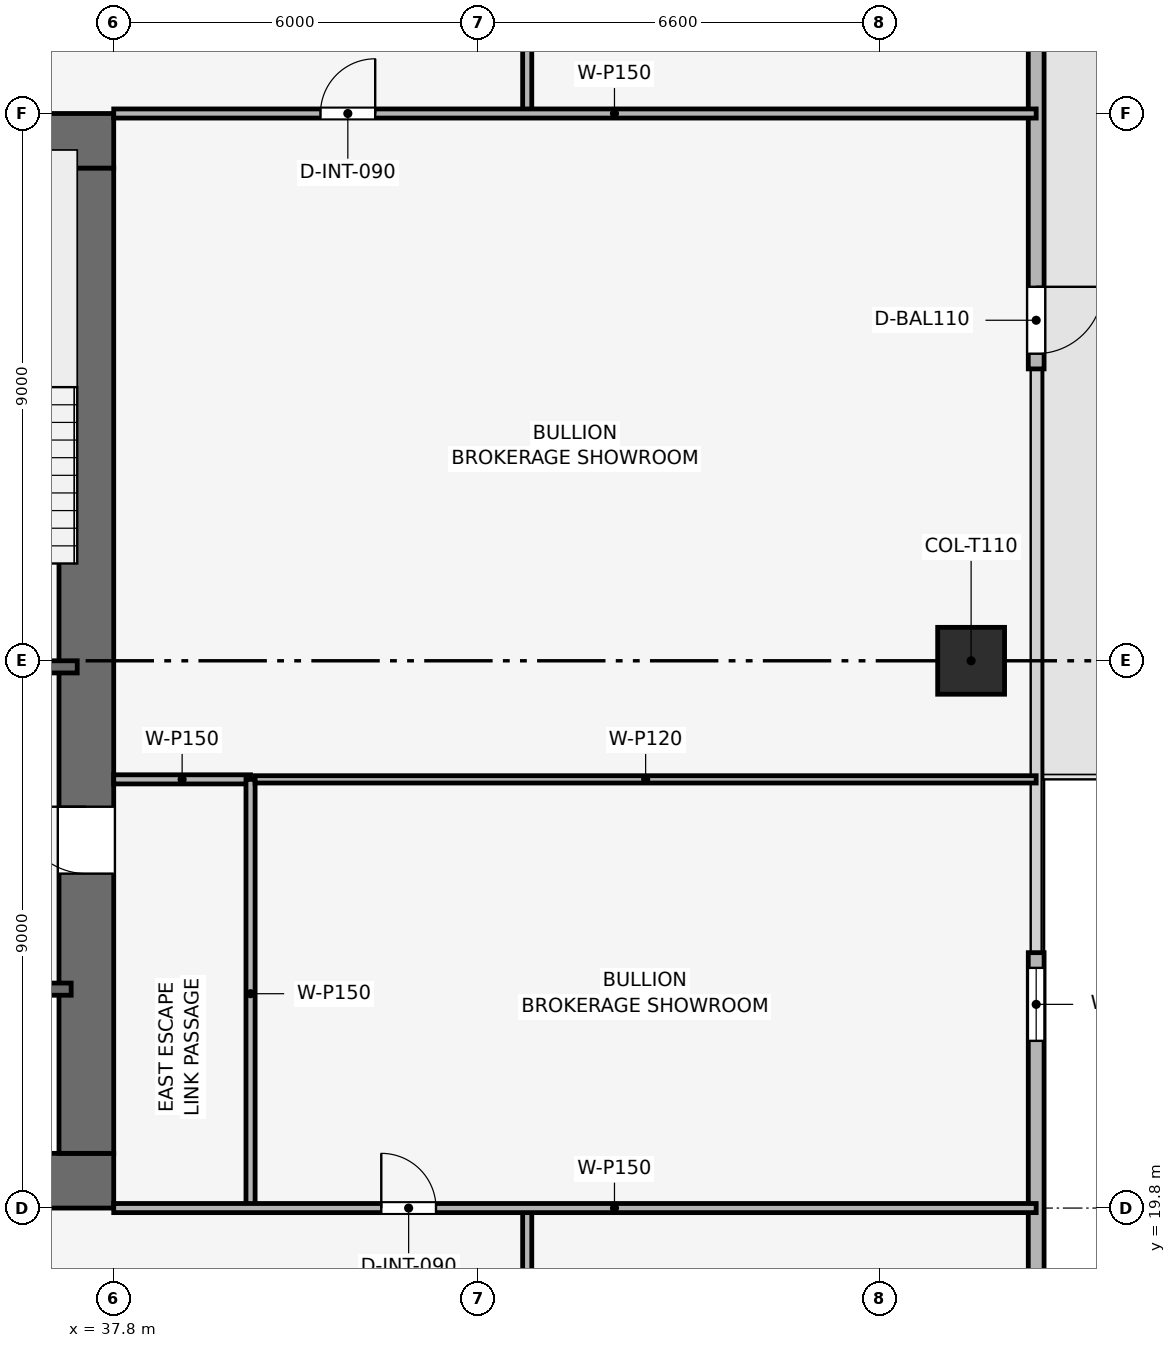
"""IFC4 building model, lengths in metres.
Left out: names, types, materials, properties, quantities, classifications, styles, units other than length and angle.
Written with IfcOpenShell. Run it as: python <this file> out.ifc"""

import sys

from ifc_helpers import new_model, si_unit, direction, frame, frame_2d, origin, origin_2d, place, context, subcontext, project, spatial, rectangle, extrude, element, fill, save


model = new_model("IFC4")
c1 = context("Model", 3, precision=1e-05, world=origin(), true_north=direction((0.0, 1.0)))
c2 = subcontext(c1, "Body", "Model", "MODEL_VIEW")
j1 = project(units=[si_unit("LENGTHUNIT", "METRE"), si_unit("PLANEANGLEUNIT", "RADIAN")], contexts=[c1])
p1 = place(None, origin())
s1 = spatial("IfcSite", under=j1, at=p1, CompositionType="ELEMENT")
p2 = place(p1, origin())
s2 = spatial("IfcBuilding", under=s1, at=p2, CompositionType="ELEMENT")
p3 = place(p2, frame((0.0, 0.0, 145.8)))
s3 = spatial("IfcBuildingStorey", under=s2, at=p3, CompositionType="ELEMENT", Elevation=145.8)
p4 = place(p3, frame((19.8, 20.25, 0.0), z_axis=(0.0, 0.0, 1.0), x_axis=(1.0, 0.0, 0.0)))
e1 = element("IfcWall", 1, at=p4, inside=s3, PredefinedType="SHEAR", context=c2, shape_type="SweptSolid", body=[
    extrude(rectangle(XDim=18.0, YDim=0.9, at=frame_2d((9.0, 0.0))), origin(), (0.0, 0.0, 1.0), 3.75),
])
p5 = place(p4, frame((8.4, 0.0, 0.0)))
e2 = element("IfcOpeningElement", 2, at=p5, cuts=e1, PredefinedType="OPENING", context=c2, shape_type="SweptSolid", body=[
    extrude(rectangle(XDim=1.2, YDim=2.2, at=frame_2d((0.6, 1.1))), frame((0.0, 0.46, 0.0), z_axis=(0.0, -1.0, 0.0), x_axis=(1.0, 0.0, 0.0)), (0.0, 0.0, 1.0), 0.92),
])
p6 = place(p3, frame((19.8, 37.35, 0.0), z_axis=(0.0, 0.0, 1.0), x_axis=(1.0, 0.0, 0.0)))
e3 = element("IfcWall", 3, at=p6, inside=s3, PredefinedType="SHEAR", context=c2, shape_type="SweptSolid", body=[
    extrude(rectangle(XDim=18.0, YDim=0.9, at=frame_2d((9.0, 0.0))), origin(), (0.0, 0.0, 1.0), 3.75),
])
p7 = place(p6, frame((7.05, 0.0, 0.0)))
e4 = element("IfcOpeningElement", 4, at=p7, cuts=e3, PredefinedType="OPENING", context=c2, shape_type="SweptSolid", body=[
    extrude(rectangle(XDim=1.1, YDim=2.15, at=frame_2d((0.55, 1.075))), frame((0.0, 0.46, 0.0), z_axis=(0.0, -1.0, 0.0), x_axis=(1.0, 0.0, 0.0)), (0.0, 0.0, 1.0), 0.92),
])
p8 = place(p3, frame((37.35, 20.7, 0.0), z_axis=(0.0, 0.0, 1.0), x_axis=(0.0, 1.0, 0.0)))
e5 = element("IfcWall", 5, at=p8, inside=s3, PredefinedType="SHEAR", context=c2, shape_type="SweptSolid", body=[
    extrude(rectangle(XDim=16.2, YDim=0.9, at=frame_2d((8.1, 0.0))), origin(), (0.0, 0.0, 1.0), 3.75),
])
p9 = place(p8, frame((4.6, 0.0, 0.0)))
e6 = element("IfcOpeningElement", 6, at=p9, cuts=e5, PredefinedType="OPENING", context=c2, shape_type="SweptSolid", body=[
    extrude(rectangle(XDim=1.1, YDim=2.15, at=frame_2d((0.55, 1.075))), frame((0.0, 0.46, 0.0), z_axis=(0.0, -1.0, 0.0), x_axis=(1.0, 0.0, 0.0)), (0.0, 0.0, 1.0), 0.92),
])
p10 = place(p3, frame((51.9, 28.8, 0.003), z_axis=(0.0, 0.0, 1.0), x_axis=(1.0, 0.0, 0.0)))
e7 = element("IfcColumn", 7, at=p10, inside=s3, PredefinedType="COLUMN", context=c2, shape_type="SweptSolid", body=[
    extrude(rectangle(XDim=1.1, YDim=1.1, at=origin_2d()), origin(), (0.0, 0.0, 1.0), 3.489),
])
p11 = place(p3, frame((52.97, 46.2, 0.0), z_axis=(0.0, 0.0, 1.0), x_axis=(0.0, -1.0, 0.0)))
e8 = element("IfcWall", 8, at=p11, inside=s3, PredefinedType="SOLIDWALL", context=c2, shape_type="SweptSolid", body=[
    extrude(rectangle(XDim=12.6, YDim=0.26, at=frame_2d((6.3, 0.0))), origin(), (0.0, 0.0, 1.0), 3.495),
])
p12 = place(p11, frame((11.25, 0.0, 0.0)))
e9 = element("IfcOpeningElement", 9, at=p12, cuts=e8, PredefinedType="OPENING", context=c2, shape_type="SweptSolid", body=[
    extrude(rectangle(XDim=1.1, YDim=2.2, at=frame_2d((0.55, 1.1))), frame((0.0, 0.14, 0.0), z_axis=(0.0, -1.0, 0.0), x_axis=(1.0, 0.0, 0.0)), (0.0, 0.0, 1.0), 0.28),
])
p13 = place(p3, frame((52.97, 24.0, 0.0), z_axis=(0.0, 0.0, 1.0), x_axis=(0.0, -1.0, 0.0)))
e10 = element("IfcWall", 10, at=p13, inside=s3, PredefinedType="SOLIDWALL", context=c2, shape_type="SweptSolid", body=[
    extrude(rectangle(XDim=12.6, YDim=0.26, at=frame_2d((6.3, 0.0))), origin(), (0.0, 0.0, 1.0), 3.495),
])
p14 = place(p13, frame((0.25, 0.0, 0.9)))
e11 = element("IfcOpeningElement", 11, at=p14, cuts=e10, PredefinedType="OPENING", context=c2, shape_type="SweptSolid", body=[
    extrude(rectangle(XDim=1.2, YDim=2.1, at=frame_2d((0.6, 1.05))), frame((0.0, 0.14, 0.0), z_axis=(0.0, -1.0, 0.0), x_axis=(1.0, 0.0, 0.0)), (0.0, 0.0, 1.0), 0.28),
])
p15 = place(p3, frame((34.05, 28.7, 0.0), z_axis=(0.0, 0.0, 1.0), x_axis=(1.0, 0.0, 0.0)))
e12 = element("IfcWall", 12, at=p15, inside=s3, PredefinedType="SHEAR", context=c2, shape_type="SweptSolid", body=[
    extrude(rectangle(XDim=3.15, YDim=0.2, at=frame_2d((1.575, 0.0))), origin(), (0.0, 0.0, 1.0), 3.495),
])
p16 = place(p15, frame((0.8, 0.0, 0.0)))
e13 = element("IfcOpeningElement", 13, at=p16, cuts=e12, PredefinedType="OPENING", context=c2, shape_type="SweptSolid", body=[
    extrude(rectangle(XDim=1.0, YDim=2.1, at=frame_2d((0.5, 1.05))), frame((0.0, 0.11, 0.0), z_axis=(0.0, -1.0, 0.0), x_axis=(1.0, 0.0, 0.0)), (0.0, 0.0, 1.0), 0.22),
])
p17 = place(p3, frame((34.05, 23.4, 0.0), z_axis=(0.0, 0.0, 1.0), x_axis=(1.0, 0.0, 0.0)))
e14 = element("IfcWall", 14, at=p17, inside=s3, PredefinedType="SHEAR", context=c2, shape_type="SweptSolid", body=[
    extrude(rectangle(XDim=3.05, YDim=0.2, at=frame_2d((1.525, 0.0))), origin(), (0.0, 0.0, 1.0), 3.495),
])
p18 = place(p17, frame((1.2, 0.0, 0.0)))
e15 = element("IfcOpeningElement", 15, at=p18, cuts=e14, PredefinedType="OPENING", context=c2, shape_type="SweptSolid", body=[
    extrude(rectangle(XDim=1.1, YDim=2.15, at=frame_2d((0.55, 1.075))), frame((0.0, 0.11, 0.0), z_axis=(0.0, -1.0, 0.0), x_axis=(1.0, 0.0, 0.0)), (0.0, 0.0, 1.0), 0.22),
])
p19 = place(p3, frame((37.8, 26.85, 0.0), z_axis=(0.0, 0.0, 1.0), x_axis=(1.0, 0.0, 0.0)))
e16 = element("IfcWall", 16, at=p19, inside=s3, PredefinedType="PARTITIONING", context=c2, shape_type="SweptSolid", body=[
    extrude(rectangle(XDim=2.25, YDim=0.15, at=frame_2d((1.125, 0.0))), origin(), (0.0, 0.0, 1.0), 3.495),
])
p20 = place(p3, frame((40.05, 19.8, 0.0), z_axis=(0.0, 0.0, 1.0), x_axis=(0.0, 1.0, 0.0)))
e17 = element("IfcWall", 17, at=p20, inside=s3, PredefinedType="PARTITIONING", context=c2, shape_type="SweptSolid", body=[
    extrude(rectangle(XDim=7.05, YDim=0.15, at=frame_2d((3.525, 0.0))), origin(), (0.0, 0.0, 1.0), 3.03),
])
p21 = place(p3, frame((40.125, 26.85, 0.0), z_axis=(0.0, 0.0, 1.0), x_axis=(1.0, 0.0, 0.0)))
e18 = element("IfcWall", 18, at=p21, inside=s3, PredefinedType="PARTITIONING", context=c2, shape_type="SweptSolid", body=[
    extrude(rectangle(XDim=12.845, YDim=0.12, at=frame_2d((6.422, 0.0))), origin(), (0.0, 0.0, 1.0), 2.98),
])
p22 = place(p3, frame((44.6, 17.4, 0.0), z_axis=(0.0, 0.0, 1.0), x_axis=(0.0, 1.0, 0.0)))
e19 = element("IfcWall", 19, at=p22, inside=s3, PredefinedType="PARTITIONING", context=c2, shape_type="SweptSolid", body=[
    extrude(rectangle(XDim=2.4, YDim=0.15, at=frame_2d((1.2, 0.0))), origin(), (0.0, 0.0, 1.0), 3.495),
])
p23 = place(p3, frame((44.6, 37.8, 0.0), z_axis=(0.0, 0.0, 1.0), x_axis=(0.0, 1.0, 0.0)))
e20 = element("IfcWall", 20, at=p23, inside=s3, PredefinedType="PARTITIONING", context=c2, shape_type="SweptSolid", body=[
    extrude(rectangle(XDim=2.4, YDim=0.15, at=frame_2d((1.2, 0.0))), origin(), (0.0, 0.0, 1.0), 3.495),
])
p24 = place(p3, frame((37.8, 19.8, 0.0), z_axis=(0.0, 0.0, 1.0), x_axis=(1.0, 0.0, 0.0)))
e21 = element("IfcWall", 21, at=p24, inside=s3, PredefinedType="PARTITIONING", context=c2, shape_type="SweptSolid", body=[
    extrude(rectangle(XDim=15.17, YDim=0.15, at=frame_2d((7.585, 0.0))), origin(), (0.0, 0.0, 1.0), 2.98),
])
p25 = place(p24, frame((4.4, 0.0, 0.0)))
e22 = element("IfcOpeningElement", 22, at=p25, cuts=e21, PredefinedType="OPENING", context=c2, shape_type="SweptSolid", body=[
    extrude(rectangle(XDim=0.9, YDim=2.1, at=frame_2d((0.45, 1.05))), frame((0.0, 0.085, 0.0), z_axis=(0.0, -1.0, 0.0), x_axis=(1.0, 0.0, 0.0)), (0.0, 0.0, 1.0), 0.17),
])
p26 = place(p3, frame((37.8, 37.8, 0.0), z_axis=(0.0, 0.0, 1.0), x_axis=(1.0, 0.0, 0.0)))
e23 = element("IfcWall", 23, at=p26, inside=s3, PredefinedType="PARTITIONING", context=c2, shape_type="SweptSolid", body=[
    extrude(rectangle(XDim=15.17, YDim=0.15, at=frame_2d((7.585, 0.0))), origin(), (0.0, 0.0, 1.0), 2.98),
])
p27 = place(p26, frame((3.4, 0.0, 0.0)))
e24 = element("IfcOpeningElement", 24, at=p27, cuts=e23, PredefinedType="OPENING", context=c2, shape_type="SweptSolid", body=[
    extrude(rectangle(XDim=0.9, YDim=2.1, at=frame_2d((0.45, 1.05))), frame((0.0, 0.085, 0.0), z_axis=(0.0, -1.0, 0.0), x_axis=(1.0, 0.0, 0.0)), (0.0, 0.0, 1.0), 0.17),
])
p28 = place(p12, origin())
e25 = element("IfcDoor", 25, at=p28, inside=s3, OperationType="SINGLE_SWING_LEFT", PredefinedType="DOOR", context=c2, shape_type="SweptSolid", body=[
    extrude(rectangle(XDim=1.1, YDim=2.2, at=frame_2d((0.55, 1.1))), frame((0.0, 0.025, 0.0), z_axis=(0.0, -1.0, 0.0), x_axis=(1.0, 0.0, 0.0)), (0.0, 0.0, 1.0), 0.05),
])
fill(e9, e25)
p29 = place(p14, origin())
e26 = element("IfcWindow", 26, at=p29, inside=s3, PartitioningType="SINGLE_PANEL", PredefinedType="WINDOW", context=c2, shape_type="SweptSolid", body=[
    extrude(rectangle(XDim=1.2, YDim=2.1, at=frame_2d((0.6, 1.05))), frame((0.0, 0.03, 0.0), z_axis=(0.0, -1.0, 0.0), x_axis=(1.0, 0.0, 0.0)), (0.0, 0.0, 1.0), 0.06),
])
fill(e11, e26)
p30 = place(p25, origin())
e27 = element("IfcDoor", 27, at=p30, inside=s3, OperationType="SINGLE_SWING_LEFT", PredefinedType="DOOR", context=c2, shape_type="SweptSolid", body=[
    extrude(rectangle(XDim=0.9, YDim=2.1, at=frame_2d((0.45, 1.05))), frame((0.0, 0.025, 0.0), z_axis=(0.0, -1.0, 0.0), x_axis=(1.0, 0.0, 0.0)), (0.0, 0.0, 1.0), 0.05),
])
fill(e22, e27)
p31 = place(p27, origin())
e28 = element("IfcDoor", 28, at=p31, inside=s3, OperationType="SINGLE_SWING_RIGHT", PredefinedType="DOOR", context=c2, shape_type="SweptSolid", body=[
    extrude(rectangle(XDim=0.9, YDim=2.1, at=frame_2d((0.45, 1.05))), frame((0.0, 0.025, 0.0), z_axis=(0.0, -1.0, 0.0), x_axis=(1.0, 0.0, 0.0)), (0.0, 0.0, 1.0), 0.05),
])
fill(e24, e28)
p32 = place(p9, origin())
e29 = element("IfcDoor", 29, at=p32, inside=s3, OperationType="SINGLE_SWING_RIGHT", PredefinedType="DOOR", context=c2, shape_type="SweptSolid", body=[
    extrude(rectangle(XDim=1.1, YDim=2.15, at=frame_2d((0.55, 1.075))), frame((0.0, 0.025, 0.0), z_axis=(0.0, -1.0, 0.0), x_axis=(1.0, 0.0, 0.0)), (0.0, 0.0, 1.0), 0.05),
])
fill(e6, e29)
save(model, sys.argv[1])
